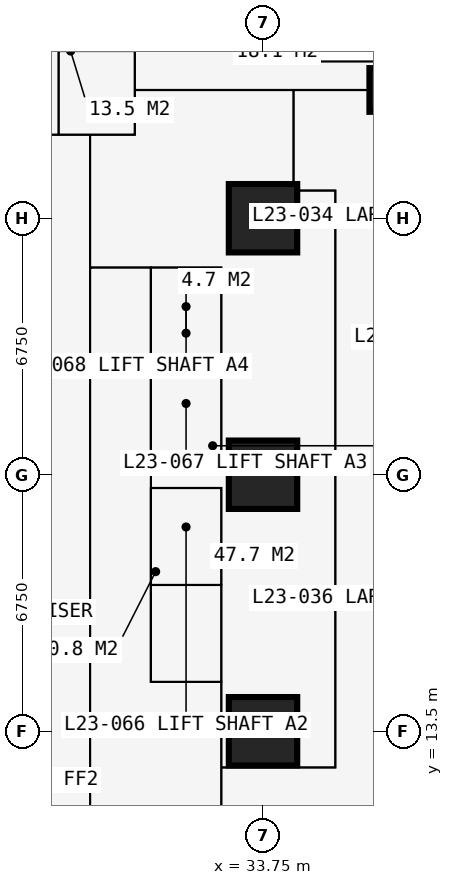
"""IFC4 building model, lengths in metres.
Left out: names, types, materials, properties, quantities, classifications, styles, units other than length and angle.
Written with IfcOpenShell. Run it as: python <this file> out.ifc"""

import sys

from ifc_helpers import new_model, si_unit, direction, frame, frame_2d, origin, origin_2d, place, context, subcontext, project, spatial, rectangle, extrude, element, fill, save


model = new_model("IFC4")
c1 = context("Model", 3, precision=1e-05, world=origin(), true_north=direction((0.0, 1.0)))
c2 = subcontext(c1, "Body", "Model", "MODEL_VIEW")
j1 = project(units=[si_unit("LENGTHUNIT", "METRE"), si_unit("PLANEANGLEUNIT", "RADIAN")], contexts=[c1])
p1 = place(None, origin())
s1 = spatial("IfcSite", under=j1, at=p1, CompositionType="ELEMENT")
p2 = place(p1, origin())
s2 = spatial("IfcBuilding", under=s1, at=p2, CompositionType="ELEMENT")
p3 = place(p2, frame((0.0, 0.0, 87.3)))
s3 = spatial("IfcBuildingStorey", under=s2, at=p3, CompositionType="ELEMENT", Elevation=87.3)
for number, where, z_axis, x_axis in (
    (1, (33.75, 13.5, 0.0), (0.0, 0.0, 1.0), (1.0, 0.0, 0.0)),
    (2, (33.75, 20.25, 0.0), (0.0, 0.0, 1.0), (1.0, 0.0, 0.0)),
    (3, (33.75, 27.0, 0.0), (0.0, 0.0, 1.0), (1.0, 0.0, 0.0)),
):
    element("IfcColumn", number, at=place(p3, frame(where, z_axis=z_axis, x_axis=x_axis)), inside=s3, PredefinedType="COLUMN", context=c2, shape_type="SweptSolid", body=[
        extrude(rectangle(XDim=1.8, YDim=1.8, at=origin_2d()), origin(), (0.0, 0.0, 1.0), 3.6),
    ])
p4 = place(p3, frame((37.125, 30.375, 0.0), z_axis=(0.0, 0.0, 1.0), x_axis=(1.0, 0.0, 0.0)))
e4 = element("IfcColumn", 4, at=p4, inside=s3, PredefinedType="COLUMN", context=c2, shape_type="SweptSolid", body=[
    extrude(rectangle(XDim=1.15, YDim=1.15, at=origin_2d()), origin(), (0.0, 0.0, 1.0), 3.6),
])
p5 = place(p3, frame((37.875, 31.125, 0.0), z_axis=(0.0, 0.0, 1.0), x_axis=(-1.0, 0.0, 0.0)))
e5 = element("IfcWall", 5, at=p5, inside=s3, PredefinedType="SOLIDWALL", context=c2, shape_type="SweptSolid", body=[
    extrude(rectangle(XDim=3.375, YDim=0.3, at=frame_2d((1.688, 0.0))), origin(), (0.0, 0.0, 1.0), 3.375),
])
p6 = place(p5, frame((0.788, 0.0, 0.6)))
e6 = element("IfcOpeningElement", 6, at=p6, cuts=e5, PredefinedType="OPENING", context=c2, shape_type="SweptSolid", body=[
    extrude(rectangle(XDim=1.8, YDim=2.1, at=frame_2d((0.9, 1.05))), frame((0.0, 0.16, 0.0), z_axis=(0.0, -1.0, 0.0), x_axis=(1.0, 0.0, 0.0)), (0.0, 0.0, 1.0), 0.32),
])
p7 = place(p3, frame((34.5, 31.125, 0.0), z_axis=(0.0, 0.0, 1.0), x_axis=(0.0, 1.0, 0.0)))
e7 = element("IfcWall", 7, at=p7, inside=s3, PredefinedType="SOLIDWALL", context=c2, shape_type="SweptSolid", body=[
    extrude(rectangle(XDim=3.375, YDim=0.3, at=frame_2d((1.688, 0.0))), origin(), (0.0, 0.0, 1.0), 3.375),
])
p8 = place(p7, frame((0.272, 0.0, 0.9)))
e8 = element("IfcOpeningElement", 8, at=p8, cuts=e7, PredefinedType="OPENING", context=c2, shape_type="SweptSolid", body=[
    extrude(rectangle(XDim=0.9, YDim=1.8, at=frame_2d((0.45, 0.9))), frame((0.0, 0.16, 0.0), z_axis=(0.0, -1.0, 0.0), x_axis=(1.0, 0.0, 0.0)), (0.0, 0.0, 1.0), 0.32),
])
p9 = place(p3, frame((11.3, 29.2, 0.0), z_axis=(0.0, 0.0, 1.0), x_axis=(1.0, 0.0, 0.0)))
e9 = element("IfcWall", 9, at=p9, inside=s3, PredefinedType="PARTITIONING", context=c2, shape_type="SweptSolid", body=[
    extrude(rectangle(XDim=19.075, YDim=0.15, at=frame_2d((9.538, 0.0))), origin(), (0.0, 0.0, 1.0), 3.375),
])
p10 = place(p9, frame((5.825, 0.0, 0.0)))
e10 = element("IfcOpeningElement", 10, at=p10, cuts=e9, PredefinedType="OPENING", context=c2, shape_type="SweptSolid", body=[
    extrude(rectangle(XDim=0.95, YDim=2.2, at=frame_2d((0.475, 1.1))), frame((0.0, 0.085, 0.0), z_axis=(0.0, -1.0, 0.0), x_axis=(1.0, 0.0, 0.0)), (0.0, 0.0, 1.0), 0.17),
])
p11 = place(p9, frame((9.2, 0.0, 0.0)))
e11 = element("IfcOpeningElement", 11, at=p11, cuts=e9, PredefinedType="OPENING", context=c2, shape_type="SweptSolid", body=[
    extrude(rectangle(XDim=0.95, YDim=2.2, at=frame_2d((0.475, 1.1))), frame((0.0, 0.085, 0.0), z_axis=(0.0, -1.0, 0.0), x_axis=(1.0, 0.0, 0.0)), (0.0, 0.0, 1.0), 0.17),
])
p12 = place(p9, frame((12.575, 0.0, 0.0)))
e12 = element("IfcOpeningElement", 12, at=p12, cuts=e9, PredefinedType="OPENING", context=c2, shape_type="SweptSolid", body=[
    extrude(rectangle(XDim=0.95, YDim=2.2, at=frame_2d((0.475, 1.1))), frame((0.0, 0.085, 0.0), z_axis=(0.0, -1.0, 0.0), x_axis=(1.0, 0.0, 0.0)), (0.0, 0.0, 1.0), 0.17),
])
p13 = place(p9, frame((15.95, 0.0, 0.0)))
e13 = element("IfcOpeningElement", 13, at=p13, cuts=e9, PredefinedType="OPENING", context=c2, shape_type="SweptSolid", body=[
    extrude(rectangle(XDim=0.95, YDim=2.2, at=frame_2d((0.475, 1.1))), frame((0.0, 0.085, 0.0), z_axis=(0.0, -1.0, 0.0), x_axis=(1.0, 0.0, 0.0)), (0.0, 0.0, 1.0), 0.17),
])
p14 = place(p9, frame((0.6, 0.0, 0.0)))
e14 = element("IfcOpeningElement", 14, at=p14, cuts=e9, PredefinedType="OPENING", context=c2, shape_type="SweptSolid", body=[
    extrude(rectangle(XDim=1.0, YDim=2.2, at=frame_2d((0.5, 1.1))), frame((0.0, 0.085, 0.0), z_axis=(0.0, -1.0, 0.0), x_axis=(1.0, 0.0, 0.0)), (0.0, 0.0, 1.0), 0.17),
])
p15 = place(p3, frame((28.375, 29.2, 0.0), z_axis=(0.0, 0.0, 1.0), x_axis=(0.0, 1.0, 0.0)))
e15 = element("IfcWall", 15, at=p15, inside=s3, PredefinedType="PARTITIONING", context=c2, shape_type="SweptSolid", body=[
    extrude(rectangle(XDim=2.2, YDim=0.1, at=frame_2d((1.1, 0.0))), origin(), (0.0, 0.0, 1.0), 3.375),
])
p16 = place(p15, frame((0.65, 0.0, 0.0)))
e16 = element("IfcOpeningElement", 16, at=p16, cuts=e15, PredefinedType="OPENING", context=c2, shape_type="SweptSolid", body=[
    extrude(rectangle(XDim=0.9, YDim=2.2, at=frame_2d((0.45, 1.1))), frame((0.0, 0.06, 0.0), z_axis=(0.0, -1.0, 0.0), x_axis=(1.0, 0.0, 0.0)), (0.0, 0.0, 1.0), 0.12),
])
p17 = place(p3, frame((28.375, 31.4, 0.0), z_axis=(0.0, 0.0, 1.0), x_axis=(1.0, 0.0, 0.0)))
e17 = element("IfcWall", 17, at=p17, inside=s3, PredefinedType="PARTITIONING", context=c2, shape_type="SweptSolid", body=[
    extrude(rectangle(XDim=2.0, YDim=0.1, at=frame_2d((1.0, 0.0))), origin(), (0.0, 0.0, 1.0), 3.375),
])
p18 = place(p3, frame((29.2, 11.3, 0.0), z_axis=(0.0, 0.0, 1.0), x_axis=(0.0, 1.0, 0.0)))
e18 = element("IfcWall", 18, at=p18, inside=s3, PredefinedType="PARTITIONING", context=c2, shape_type="SweptSolid", body=[
    extrude(rectangle(XDim=17.9, YDim=0.2, at=frame_2d((8.95, 0.0))), origin(), (0.0, 0.0, 1.0), 3.375),
])
p19 = place(p18, frame((8.35, 0.0, 0.0)))
e19 = element("IfcOpeningElement", 19, at=p19, cuts=e18, PredefinedType="OPENING", context=c2, shape_type="SweptSolid", body=[
    extrude(rectangle(XDim=1.2, YDim=2.2, at=frame_2d((0.6, 1.1))), frame((0.0, 0.11, 0.0), z_axis=(0.0, -1.0, 0.0), x_axis=(1.0, 0.0, 0.0)), (0.0, 0.0, 1.0), 0.22),
])
p20 = place(p3, frame((29.2, 25.7, 0.0), z_axis=(0.0, 0.0, 1.0), x_axis=(1.0, 0.0, 0.0)))
e20 = element("IfcWall", 20, at=p20, inside=s3, PredefinedType="SHEAR", context=c2, shape_type="SweptSolid", body=[
    extrude(rectangle(XDim=3.45, YDim=0.1, at=frame_2d((1.725, 0.0))), origin(), (0.0, 0.0, 1.0), 3.375),
])
p21 = place(p3, frame((30.375, 29.2, 0.0), z_axis=(0.0, 0.0, 1.0), x_axis=(0.0, 1.0, 0.0)))
e21 = element("IfcWall", 21, at=p21, inside=s3, PredefinedType="PARTITIONING", context=c2, shape_type="SweptSolid", body=[
    extrude(rectangle(XDim=5.284, YDim=0.15, at=frame_2d((2.642, 0.0))), origin(), (0.0, 0.0, 1.0), 3.375),
])
p22 = place(p3, frame((30.375, 30.375, 0.0), z_axis=(0.0, 0.0, 1.0), x_axis=(1.0, 0.0, 0.0)))
e22 = element("IfcWall", 22, at=p22, inside=s3, PredefinedType="PARTITIONING", context=c2, shape_type="SweptSolid", body=[
    extrude(rectangle(XDim=7.35, YDim=0.15, at=frame_2d((3.675, 0.0))), origin(), (0.0, 0.0, 1.0), 2.877),
])
p23 = place(p22, frame((5.125, 0.0, 0.0)))
e23 = element("IfcOpeningElement", 23, at=p23, cuts=e22, PredefinedType="OPENING", context=c2, shape_type="SweptSolid", body=[
    extrude(rectangle(XDim=1.0, YDim=2.2, at=frame_2d((0.5, 1.1))), frame((0.0, 0.085, 0.0), z_axis=(0.0, -1.0, 0.0), x_axis=(1.0, 0.0, 0.0)), (0.0, 0.0, 1.0), 0.17),
])
p24 = place(p3, frame((30.8, 14.8, 0.0), z_axis=(0.0, 0.0, 1.0), x_axis=(0.0, 1.0, 0.0)))
e24 = element("IfcWall", 24, at=p24, inside=s3, PredefinedType="PARTITIONING", context=c2, shape_type="SweptSolid", body=[
    extrude(rectangle(XDim=10.9, YDim=0.15, at=frame_2d((5.45, 0.0))), origin(), (0.0, 0.0, 1.0), 3.375),
])
p25 = place(p24, frame((0.75, 0.0, 0.0)))
e25 = element("IfcOpeningElement", 25, at=p25, cuts=e24, PredefinedType="OPENING", context=c2, shape_type="SweptSolid", body=[
    extrude(rectangle(XDim=1.1, YDim=2.2, at=frame_2d((0.55, 1.1))), frame((0.0, 0.085, 0.0), z_axis=(0.0, -1.0, 0.0), x_axis=(1.0, 0.0, 0.0)), (0.0, 0.0, 1.0), 0.17),
])
p26 = place(p24, frame((3.25, 0.0, 0.0)))
e26 = element("IfcOpeningElement", 26, at=p26, cuts=e24, PredefinedType="OPENING", context=c2, shape_type="SweptSolid", body=[
    extrude(rectangle(XDim=1.1, YDim=2.2, at=frame_2d((0.55, 1.1))), frame((0.0, 0.085, 0.0), z_axis=(0.0, -1.0, 0.0), x_axis=(1.0, 0.0, 0.0)), (0.0, 0.0, 1.0), 0.17),
])
p27 = place(p24, frame((6.5, 0.0, 0.0)))
e27 = element("IfcOpeningElement", 27, at=p27, cuts=e24, PredefinedType="OPENING", context=c2, shape_type="SweptSolid", body=[
    extrude(rectangle(XDim=1.1, YDim=2.2, at=frame_2d((0.55, 1.1))), frame((0.0, 0.085, 0.0), z_axis=(0.0, -1.0, 0.0), x_axis=(1.0, 0.0, 0.0)), (0.0, 0.0, 1.0), 0.17),
])
p28 = place(p24, frame((9.05, 0.0, 0.0)))
e28 = element("IfcOpeningElement", 28, at=p28, cuts=e24, PredefinedType="OPENING", context=c2, shape_type="SweptSolid", body=[
    extrude(rectangle(XDim=1.1, YDim=2.2, at=frame_2d((0.55, 1.1))), frame((0.0, 0.085, 0.0), z_axis=(0.0, -1.0, 0.0), x_axis=(1.0, 0.0, 0.0)), (0.0, 0.0, 1.0), 0.17),
])
for number, where, z_axis, x_axis in (
    (29, (30.8, 14.8, 0.0), (0.0, 0.0, 1.0), (1.0, 0.0, 0.0)),
    (30, (30.8, 17.35, 0.0), (0.0, 0.0, 1.0), (1.0, 0.0, 0.0)),
    (31, (30.8, 19.9, 0.0), (0.0, 0.0, 1.0), (1.0, 0.0, 0.0)),
    (32, (30.8, 20.6, 0.0), (0.0, 0.0, 1.0), (1.0, 0.0, 0.0)),
    (33, (30.8, 23.15, 0.0), (0.0, 0.0, 1.0), (1.0, 0.0, 0.0)),
):
    element("IfcWall", number, at=place(p3, frame(where, z_axis=z_axis, x_axis=x_axis)), inside=s3, PredefinedType="SHEAR", context=c2, shape_type="SweptSolid", body=[
        extrude(rectangle(XDim=1.85, YDim=0.1, at=frame_2d((0.925, 0.0))), origin(), (0.0, 0.0, 1.0), 3.375),
    ])
p29 = place(p3, frame((32.65, 10.6, 0.0), z_axis=(0.0, 0.0, 1.0), x_axis=(0.0, 1.0, 0.0)))
e34 = element("IfcWall", 34, at=p29, inside=s3, PredefinedType="SHEAR", context=c2, shape_type="SweptSolid", body=[
    extrude(rectangle(XDim=9.3, YDim=0.1, at=frame_2d((4.65, 0.0))), origin(), (0.0, 0.0, 1.0), 3.375),
])
p30 = place(p29, frame((0.5, 0.0, 0.0)))
e35 = element("IfcOpeningElement", 35, at=p30, cuts=e34, PredefinedType="OPENING", context=c2, shape_type="SweptSolid", body=[
    extrude(rectangle(XDim=1.0, YDim=2.2, at=frame_2d((0.5, 1.1))), frame((0.0, 0.06, 0.0), z_axis=(0.0, -1.0, 0.0), x_axis=(1.0, 0.0, 0.0)), (0.0, 0.0, 1.0), 0.12),
])
p31 = place(p3, frame((32.65, 12.55, 0.0), z_axis=(0.0, 0.0, 1.0), x_axis=(1.0, 0.0, 0.0)))
e36 = element("IfcWall", 36, at=p31, inside=s3, PredefinedType="PARTITIONING", context=c2, shape_type="SweptSolid", body=[
    extrude(rectangle(XDim=3.0, YDim=0.15, at=frame_2d((1.5, 0.0))), origin(), (0.0, 0.0, 1.0), 3.375),
])
p32 = place(p3, frame((32.65, 20.6, 0.0), z_axis=(0.0, 0.0, 1.0), x_axis=(0.0, 1.0, 0.0)))
e37 = element("IfcWall", 37, at=p32, inside=s3, PredefinedType="PARTITIONING", context=c2, shape_type="SweptSolid", body=[
    extrude(rectangle(XDim=5.1, YDim=0.15, at=frame_2d((2.55, 0.0))), origin(), (0.0, 0.0, 1.0), 3.375),
])
p33 = place(p3, frame((34.55, 27.725, 0.0), z_axis=(0.0, 0.0, 1.0), x_axis=(0.0, 1.0, 0.0)))
e38 = element("IfcWall", 38, at=p33, inside=s3, PredefinedType="PARTITIONING", context=c2, shape_type="SweptSolid", body=[
    extrude(rectangle(XDim=2.65, YDim=0.15, at=frame_2d((1.325, 0.0))), origin(), (0.0, 0.0, 1.0), 3.375),
])
p34 = place(p3, frame((34.55, 27.725, 0.0), z_axis=(0.0, 0.0, 1.0), x_axis=(1.0, 0.0, 0.0)))
e39 = element("IfcWall", 39, at=p34, inside=s3, PredefinedType="PARTITIONING", context=c2, shape_type="SweptSolid", body=[
    extrude(rectangle(XDim=1.1, YDim=0.15, at=frame_2d((0.55, 0.0))), origin(), (0.0, 0.0, 1.0), 3.375),
])
p35 = place(p3, frame((35.65, 12.55, 0.0), z_axis=(0.0, 0.0, 1.0), x_axis=(0.0, 1.0, 0.0)))
e40 = element("IfcWall", 40, at=p35, inside=s3, PredefinedType="PARTITIONING", context=c2, shape_type="SweptSolid", body=[
    extrude(rectangle(XDim=15.175, YDim=0.15, at=frame_2d((7.587, 0.0))), origin(), (0.0, 0.0, 1.0), 3.375),
])
p36 = place(p35, frame((5.8, 0.0, 0.0)))
e41 = element("IfcOpeningElement", 41, at=p36, cuts=e40, PredefinedType="OPENING", context=c2, shape_type="SweptSolid", body=[
    extrude(rectangle(XDim=0.95, YDim=2.2, at=frame_2d((0.475, 1.1))), frame((0.0, 0.085, 0.0), z_axis=(0.0, -1.0, 0.0), x_axis=(1.0, 0.0, 0.0)), (0.0, 0.0, 1.0), 0.17),
])
p37 = place(p6, origin())
e42 = element("IfcWindow", 42, at=p37, inside=s3, PartitioningType="SINGLE_PANEL", PredefinedType="WINDOW", context=c2, shape_type="SweptSolid", body=[
    extrude(rectangle(XDim=1.8, YDim=2.1, at=frame_2d((0.9, 1.05))), frame((0.0, 0.03, 0.0), z_axis=(0.0, -1.0, 0.0), x_axis=(1.0, 0.0, 0.0)), (0.0, 0.0, 1.0), 0.06),
])
fill(e6, e42)
p38 = place(p30, origin())
e43 = element("IfcDoor", 43, at=p38, inside=s3, OperationType="SINGLE_SWING_LEFT", PredefinedType="DOOR", context=c2, shape_type="SweptSolid", body=[
    extrude(rectangle(XDim=1.0, YDim=2.2, at=frame_2d((0.5, 1.1))), frame((0.0, 0.025, 0.0), z_axis=(0.0, -1.0, 0.0), x_axis=(1.0, 0.0, 0.0)), (0.0, 0.0, 1.0), 0.05),
])
fill(e35, e43)
p39 = place(p36, origin())
e44 = element("IfcDoor", 44, at=p39, inside=s3, OperationType="SINGLE_SWING_LEFT", PredefinedType="DOOR", context=c2, shape_type="SweptSolid", body=[
    extrude(rectangle(XDim=0.95, YDim=2.2, at=frame_2d((0.475, 1.1))), frame((0.0, 0.025, 0.0), z_axis=(0.0, -1.0, 0.0), x_axis=(1.0, 0.0, 0.0)), (0.0, 0.0, 1.0), 0.05),
])
fill(e41, e44)
p40 = place(p23, origin())
e45 = element("IfcDoor", 45, at=p40, inside=s3, OperationType="SINGLE_SWING_LEFT", PredefinedType="DOOR", context=c2, shape_type="SweptSolid", body=[
    extrude(rectangle(XDim=1.0, YDim=2.2, at=frame_2d((0.5, 1.1))), frame((0.0, 0.025, 0.0), z_axis=(0.0, -1.0, 0.0), x_axis=(1.0, 0.0, 0.0)), (0.0, 0.0, 1.0), 0.05),
])
fill(e23, e45)
p41 = place(p13, origin())
e46 = element("IfcDoor", 46, at=p41, inside=s3, OperationType="SINGLE_SWING_LEFT", PredefinedType="DOOR", context=c2, shape_type="SweptSolid", body=[
    extrude(rectangle(XDim=0.95, YDim=2.2, at=frame_2d((0.475, 1.1))), frame((0.0, 0.025, 0.0), z_axis=(0.0, -1.0, 0.0), x_axis=(1.0, 0.0, 0.0)), (0.0, 0.0, 1.0), 0.05),
])
fill(e13, e46)
p42 = place(p16, origin())
e47 = element("IfcDoor", 47, at=p42, inside=s3, OperationType="SINGLE_SWING_RIGHT", PredefinedType="DOOR", context=c2, shape_type="SweptSolid", body=[
    extrude(rectangle(XDim=0.9, YDim=2.2, at=frame_2d((0.45, 1.1))), frame((0.0, 0.025, 0.0), z_axis=(0.0, -1.0, 0.0), x_axis=(1.0, 0.0, 0.0)), (0.0, 0.0, 1.0), 0.05),
])
fill(e16, e47)
p43 = place(p25, origin())
e48 = element("IfcDoor", 48, at=p43, inside=s3, OperationType="DOUBLE_DOOR_SLIDING", PredefinedType="DOOR", context=c2, shape_type="SweptSolid", body=[
    extrude(rectangle(XDim=1.1, YDim=2.2, at=frame_2d((0.55, 1.1))), frame((0.0, 0.025, 0.0), z_axis=(0.0, -1.0, 0.0), x_axis=(1.0, 0.0, 0.0)), (0.0, 0.0, 1.0), 0.05),
])
fill(e25, e48)
p44 = place(p26, origin())
e49 = element("IfcDoor", 49, at=p44, inside=s3, OperationType="DOUBLE_DOOR_SLIDING", PredefinedType="DOOR", context=c2, shape_type="SweptSolid", body=[
    extrude(rectangle(XDim=1.1, YDim=2.2, at=frame_2d((0.55, 1.1))), frame((0.0, 0.025, 0.0), z_axis=(0.0, -1.0, 0.0), x_axis=(1.0, 0.0, 0.0)), (0.0, 0.0, 1.0), 0.05),
])
fill(e26, e49)
p45 = place(p27, origin())
e50 = element("IfcDoor", 50, at=p45, inside=s3, OperationType="DOUBLE_DOOR_SLIDING", PredefinedType="DOOR", context=c2, shape_type="SweptSolid", body=[
    extrude(rectangle(XDim=1.1, YDim=2.2, at=frame_2d((0.55, 1.1))), frame((0.0, 0.025, 0.0), z_axis=(0.0, -1.0, 0.0), x_axis=(1.0, 0.0, 0.0)), (0.0, 0.0, 1.0), 0.05),
])
fill(e27, e50)
p46 = place(p28, origin())
e51 = element("IfcDoor", 51, at=p46, inside=s3, OperationType="DOUBLE_DOOR_SLIDING", PredefinedType="DOOR", context=c2, shape_type="SweptSolid", body=[
    extrude(rectangle(XDim=1.1, YDim=2.2, at=frame_2d((0.55, 1.1))), frame((0.0, 0.025, 0.0), z_axis=(0.0, -1.0, 0.0), x_axis=(1.0, 0.0, 0.0)), (0.0, 0.0, 1.0), 0.05),
])
fill(e28, e51)
p47 = place(p19, origin())
e52 = element("IfcDoor", 52, at=p47, inside=s3, OperationType="DOUBLE_DOOR_SINGLE_SWING", PredefinedType="DOOR", context=c2, shape_type="SweptSolid", body=[
    extrude(rectangle(XDim=1.2, YDim=2.2, at=frame_2d((0.6, 1.1))), frame((0.0, 0.025, 0.0), z_axis=(0.0, -1.0, 0.0), x_axis=(1.0, 0.0, 0.0)), (0.0, 0.0, 1.0), 0.05),
])
fill(e19, e52)
save(model, sys.argv[1])
